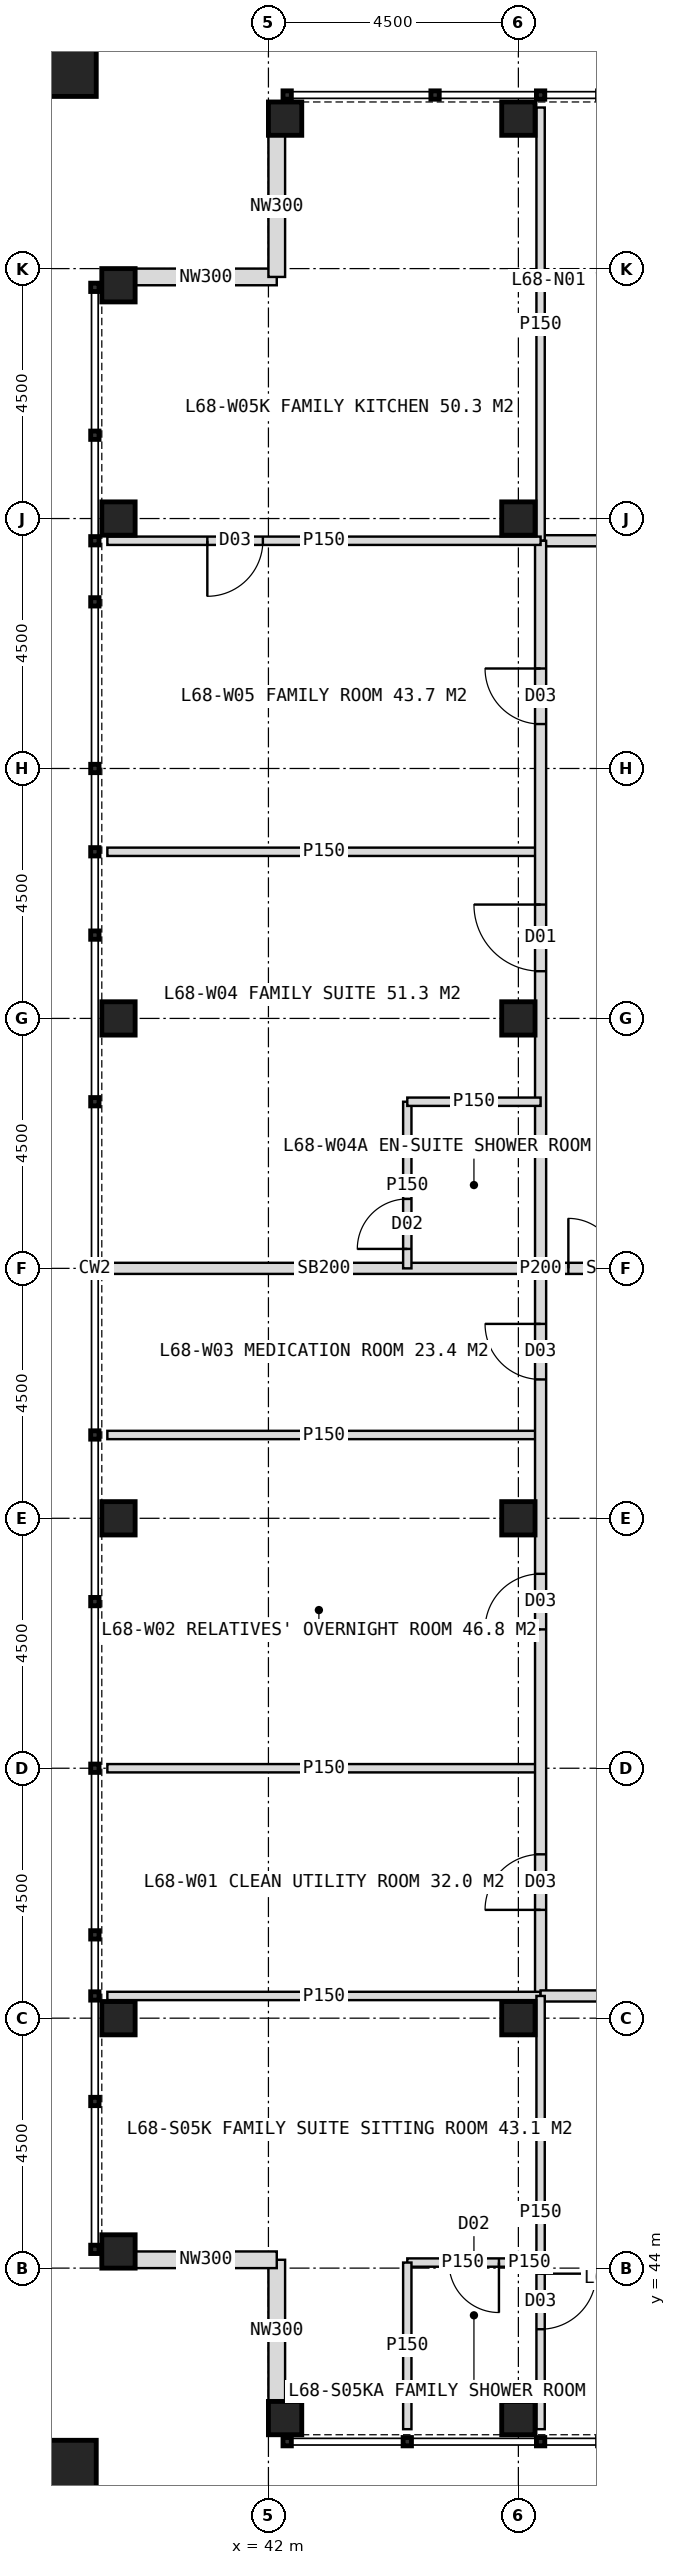
"""IFC4 building model, lengths in metres.
Left out: names, types, materials, properties, quantities, classifications, styles, units other than length and angle.
Written with IfcOpenShell. Run it as: python <this file> out.ifc"""

import sys

from ifc_helpers import new_model, si_unit, direction, frame, frame_2d, origin, origin_2d, place, context, subcontext, project, spatial, rectangle, hollow_rectangle, extrude, element, fill, save


model = new_model("IFC4")
c1 = context("Model", 3, precision=1e-05, world=origin(), true_north=direction((0.0, 1.0)))
c2 = subcontext(c1, "Body", "Model", "MODEL_VIEW")
j1 = project(units=[si_unit("LENGTHUNIT", "METRE"), si_unit("PLANEANGLEUNIT", "RADIAN")], contexts=[c1])
p1 = place(None, origin())
s1 = spatial("IfcSite", under=j1, at=p1, CompositionType="ELEMENT")
p2 = place(p1, origin())
s2 = spatial("IfcBuilding", under=s1, at=p2, CompositionType="ELEMENT")
p3 = place(p2, frame((0.0, 0.0, 282.0)))
s3 = spatial("IfcBuildingStorey", under=s2, at=p3, CompositionType="ELEMENT", Elevation=282.0)
for number, where, z_axis, x_axis in (
    (1, (46.5, 48.5, 0.0), (0.0, 0.0, 1.0), (1.0, 0.0, 0.0)),
    (2, (46.5, 75.5, 0.0), (0.0, 0.0, 1.0), (1.0, 0.0, 0.0)),
    (3, (46.5, 57.5, 0.0), (0.0, 0.0, 1.0), (1.0, 0.0, 0.0)),
    (4, (46.5, 66.5, 0.0), (0.0, 0.0, 1.0), (1.0, 0.0, 0.0)),
    (5, (42.3, 41.3, 0.0), (0.0, 0.0, 1.0), (1.0, 0.0, 0.0)),
    (6, (42.3, 82.7, 0.0), (0.0, 0.0, 1.0), (1.0, 0.0, 0.0)),
    (7, (39.3, 44.3, 0.0), (0.0, 0.0, 1.0), (1.0, 0.0, 0.0)),
    (8, (46.5, 41.3, 0.0), (0.0, 0.0, 1.0), (1.0, 0.0, 0.0)),
    (9, (46.5, 82.7, 0.0), (0.0, 0.0, 1.0), (1.0, 0.0, 0.0)),
    (10, (39.3, 48.5, 0.0), (0.0, 0.0, 1.0), (1.0, 0.0, 0.0)),
    (11, (39.3, 57.5, 0.0), (0.0, 0.0, 1.0), (1.0, 0.0, 0.0)),
    (12, (39.3, 66.5, 0.0), (0.0, 0.0, 1.0), (1.0, 0.0, 0.0)),
    (13, (39.3, 75.5, 0.0), (0.0, 0.0, 1.0), (1.0, 0.0, 0.0)),
    (14, (39.3, 79.7, 0.0), (0.0, 0.0, 1.0), (1.0, 0.0, 0.0)),
):
    element("IfcColumn", number, at=place(p3, frame(where, z_axis=z_axis, x_axis=x_axis)), inside=s3, PredefinedType="COLUMN", context=c2, shape_type="SweptSolid", body=[
        extrude(hollow_rectangle(XDim=0.6, YDim=0.6, WallThickness=0.04, at=origin_2d()), origin(), (0.0, 0.0, 1.0), 4.0),
    ])
for number, where, z_axis, x_axis in (
    (15, (38.4, 40.4, 0.0), (0.0, 0.0, 1.0), (1.0, 0.0, 0.0)),
    (16, (38.4, 83.6, 0.0), (0.0, 0.0, 1.0), (1.0, 0.0, 0.0)),
):
    element("IfcColumn", number, at=place(p3, frame(where, z_axis=z_axis, x_axis=x_axis)), inside=s3, PredefinedType="COLUMN", context=c2, shape_type="SweptSolid", body=[
        extrude(hollow_rectangle(XDim=1.0, YDim=1.0, WallThickness=0.06, at=origin_2d()), origin(), (0.0, 0.0, 1.0), 4.0),
    ])
for number, where, z_axis, x_axis in (
    (17, (39.6, 79.85, 0.0), (0.0, 0.0, 1.0), (1.0, 0.0, 0.0)),
    (18, (42.15, 79.85, 0.0), (0.0, 0.0, 1.0), (0.0, 1.0, 0.0)),
    (19, (42.15, 41.6, 0.0), (0.0, 0.0, 1.0), (0.0, 1.0, 0.0)),
    (20, (42.15, 44.15, 0.0), (0.0, 0.0, 1.0), (-1.0, 0.0, 0.0)),
):
    element("IfcWall", number, at=place(p3, frame(where, z_axis=z_axis, x_axis=x_axis)), inside=s3, PredefinedType="ELEMENTEDWALL", context=c2, shape_type="SweptSolid", body=[
        extrude(rectangle(XDim=2.55, YDim=0.3, at=frame_2d((1.275, 0.0))), origin(), (0.0, 0.0, 1.0), 2.95),
    ])
p4 = place(p3, frame((46.9, 75.1, 0.0), z_axis=(0.0, 0.0, 1.0), x_axis=(1.0, 0.0, 0.0)))
e21 = element("IfcWall", 21, at=p4, inside=s3, PredefinedType="PARTITIONING", context=c2, shape_type="SweptSolid", body=[
    extrude(rectangle(XDim=26.2, YDim=0.2, at=frame_2d((13.1, 0.0))), origin(), (0.0, 0.0, 1.0), 3.75),
])
p5 = place(p4, frame((1.55, 0.0, 0.0)))
e22 = element("IfcOpeningElement", 22, at=p5, cuts=e21, PredefinedType="OPENING", context=c2, shape_type="SweptSolid", body=[
    extrude(rectangle(XDim=1.0, YDim=2.1, at=frame_2d((0.5, 1.05))), frame((0.0, 0.11, 0.0), z_axis=(0.0, -1.0, 0.0), x_axis=(1.0, 0.0, 0.0)), (0.0, 0.0, 1.0), 0.22),
])
p6 = place(p4, frame((6.75, 0.0, 0.0)))
e23 = element("IfcOpeningElement", 23, at=p6, cuts=e21, PredefinedType="OPENING", context=c2, shape_type="SweptSolid", body=[
    extrude(rectangle(XDim=1.0, YDim=2.1, at=frame_2d((0.5, 1.05))), frame((0.0, 0.11, 0.0), z_axis=(0.0, -1.0, 0.0), x_axis=(1.0, 0.0, 0.0)), (0.0, 0.0, 1.0), 0.22),
])
p7 = place(p4, frame((14.25, 0.0, 0.0)))
e24 = element("IfcOpeningElement", 24, at=p7, cuts=e21, PredefinedType="OPENING", context=c2, shape_type="SweptSolid", body=[
    extrude(rectangle(XDim=1.2, YDim=2.2, at=frame_2d((0.6, 1.1))), frame((0.0, 0.11, 0.0), z_axis=(0.0, -1.0, 0.0), x_axis=(1.0, 0.0, 0.0)), (0.0, 0.0, 1.0), 0.22),
])
p8 = place(p4, frame((18.45, 0.0, 0.0)))
e25 = element("IfcOpeningElement", 25, at=p8, cuts=e21, PredefinedType="OPENING", context=c2, shape_type="SweptSolid", body=[
    extrude(rectangle(XDim=1.0, YDim=2.1, at=frame_2d((0.5, 1.05))), frame((0.0, 0.11, 0.0), z_axis=(0.0, -1.0, 0.0), x_axis=(1.0, 0.0, 0.0)), (0.0, 0.0, 1.0), 0.22),
])
p9 = place(p4, frame((23.25, 0.0, 0.0)))
e26 = element("IfcOpeningElement", 26, at=p9, cuts=e21, PredefinedType="OPENING", context=c2, shape_type="SweptSolid", body=[
    extrude(rectangle(XDim=1.2, YDim=2.2, at=frame_2d((0.6, 1.1))), frame((0.0, 0.11, 0.0), z_axis=(0.0, -1.0, 0.0), x_axis=(1.0, 0.0, 0.0)), (0.0, 0.0, 1.0), 0.22),
])
for number, where, z_axis, x_axis in (
    (27, (46.9, 75.1, 0.0), (0.0, 0.0, 1.0), (0.0, 1.0, 0.0)),
    (28, (46.9, 53.0, 0.0), (0.0, 0.0, 1.0), (-1.0, 0.0, 0.0)),
    (29, (46.9, 59.0, 0.0), (0.0, 0.0, 1.0), (-1.0, 0.0, 0.0)),
):
    element("IfcWall", number, at=place(p3, frame(where, z_axis=z_axis, x_axis=x_axis)), inside=s3, PredefinedType="PARTITIONING", context=c2, shape_type="SweptSolid", body=[
        extrude(rectangle(XDim=7.8, YDim=0.15, at=frame_2d((3.9, 0.0))), origin(), (0.0, 0.0, 1.0), 3.75),
    ])
p10 = place(p3, frame((46.9, 62.0, 0.0), z_axis=(0.0, 0.0, 1.0), x_axis=(-1.0, 0.0, 0.0)))
e30 = element("IfcWall", 30, at=p10, inside=s3, PredefinedType="SOLIDWALL", context=c2, shape_type="SweptSolid", body=[
    extrude(rectangle(XDim=7.8, YDim=0.2, at=frame_2d((3.9, 0.0))), origin(), (0.0, 0.0, 1.0), 2.75),
])
p11 = place(p3, frame((46.9, 69.5, 0.0), z_axis=(0.0, 0.0, 1.0), x_axis=(-1.0, 0.0, 0.0)))
e31 = element("IfcWall", 31, at=p11, inside=s3, PredefinedType="PARTITIONING", context=c2, shape_type="SweptSolid", body=[
    extrude(rectangle(XDim=7.8, YDim=0.15, at=frame_2d((3.9, 0.0))), origin(), (0.0, 0.0, 1.0), 3.75),
])
p12 = place(p3, frame((46.9, 48.9, 0.0), z_axis=(0.0, 0.0, 1.0), x_axis=(0.0, 1.0, 0.0)))
e32 = element("IfcWall", 32, at=p12, inside=s3, PredefinedType="PARTITIONING", context=c2, shape_type="SweptSolid", body=[
    extrude(rectangle(XDim=26.2, YDim=0.2, at=frame_2d((13.1, 0.0))), origin(), (0.0, 0.0, 1.0), 3.75),
])
p13 = place(p12, frame((1.55, 0.0, 0.0)))
e33 = element("IfcOpeningElement", 33, at=p13, cuts=e32, PredefinedType="OPENING", context=c2, shape_type="SweptSolid", body=[
    extrude(rectangle(XDim=1.0, YDim=2.1, at=frame_2d((0.5, 1.05))), frame((0.0, 0.11, 0.0), z_axis=(0.0, -1.0, 0.0), x_axis=(1.0, 0.0, 0.0)), (0.0, 0.0, 1.0), 0.22),
])
p14 = place(p12, frame((6.6, 0.0, 0.0)))
e34 = element("IfcOpeningElement", 34, at=p14, cuts=e32, PredefinedType="OPENING", context=c2, shape_type="SweptSolid", body=[
    extrude(rectangle(XDim=1.0, YDim=2.1, at=frame_2d((0.5, 1.05))), frame((0.0, 0.11, 0.0), z_axis=(0.0, -1.0, 0.0), x_axis=(1.0, 0.0, 0.0)), (0.0, 0.0, 1.0), 0.22),
])
p15 = place(p12, frame((11.1, 0.0, 0.0)))
e35 = element("IfcOpeningElement", 35, at=p15, cuts=e32, PredefinedType="OPENING", context=c2, shape_type="SweptSolid", body=[
    extrude(rectangle(XDim=1.0, YDim=2.1, at=frame_2d((0.5, 1.05))), frame((0.0, 0.11, 0.0), z_axis=(0.0, -1.0, 0.0), x_axis=(1.0, 0.0, 0.0)), (0.0, 0.0, 1.0), 0.22),
])
p16 = place(p12, frame((18.45, 0.0, 0.0)))
e36 = element("IfcOpeningElement", 36, at=p16, cuts=e32, PredefinedType="OPENING", context=c2, shape_type="SweptSolid", body=[
    extrude(rectangle(XDim=1.2, YDim=2.2, at=frame_2d((0.6, 1.1))), frame((0.0, 0.11, 0.0), z_axis=(0.0, -1.0, 0.0), x_axis=(1.0, 0.0, 0.0)), (0.0, 0.0, 1.0), 0.22),
])
p17 = place(p12, frame((22.9, 0.0, 0.0)))
e37 = element("IfcOpeningElement", 37, at=p17, cuts=e32, PredefinedType="OPENING", context=c2, shape_type="SweptSolid", body=[
    extrude(rectangle(XDim=1.0, YDim=2.1, at=frame_2d((0.5, 1.05))), frame((0.0, 0.11, 0.0), z_axis=(0.0, -1.0, 0.0), x_axis=(1.0, 0.0, 0.0)), (0.0, 0.0, 1.0), 0.22),
])
p18 = place(p3, frame((46.9, 48.9, 0.0), z_axis=(0.0, 0.0, 1.0), x_axis=(-1.0, 0.0, 0.0)))
e38 = element("IfcWall", 38, at=p18, inside=s3, PredefinedType="PARTITIONING", context=c2, shape_type="SweptSolid", body=[
    extrude(rectangle(XDim=7.8, YDim=0.15, at=frame_2d((3.9, 0.0))), origin(), (0.0, 0.0, 1.0), 3.75),
])
p19 = place(p3, frame((44.5, 62.0, 0.0), z_axis=(0.0, 0.0, 1.0), x_axis=(0.0, 1.0, 0.0)))
e39 = element("IfcWall", 39, at=p19, inside=s3, PredefinedType="PARTITIONING", context=c2, shape_type="SweptSolid", body=[
    extrude(rectangle(XDim=3.0, YDim=0.15, at=frame_2d((1.5, 0.0))), origin(), (0.0, 0.0, 1.0), 3.75),
])
p20 = place(p19, frame((0.35, 0.0, 0.0)))
e40 = element("IfcOpeningElement", 40, at=p20, cuts=e39, PredefinedType="OPENING", context=c2, shape_type="SweptSolid", body=[
    extrude(rectangle(XDim=0.9, YDim=2.1, at=frame_2d((0.45, 1.05))), frame((0.0, 0.085, 0.0), z_axis=(0.0, -1.0, 0.0), x_axis=(1.0, 0.0, 0.0)), (0.0, 0.0, 1.0), 0.17),
])
p21 = place(p3, frame((46.9, 65.0, 0.0), z_axis=(0.0, 0.0, 1.0), x_axis=(-1.0, 0.0, 0.0)))
e41 = element("IfcWall", 41, at=p21, inside=s3, PredefinedType="PARTITIONING", context=c2, shape_type="SweptSolid", body=[
    extrude(rectangle(XDim=2.4, YDim=0.15, at=frame_2d((1.2, 0.0))), origin(), (0.0, 0.0, 1.0), 3.75),
])
p22 = place(p3, frame((46.9, 75.1, 0.0), z_axis=(0.0, 0.0, 1.0), x_axis=(-1.0, 0.0, 0.0)))
e42 = element("IfcWall", 42, at=p22, inside=s3, PredefinedType="PARTITIONING", context=c2, shape_type="SweptSolid", body=[
    extrude(rectangle(XDim=7.8, YDim=0.15, at=frame_2d((3.9, 0.0))), origin(), (0.0, 0.0, 1.0), 3.75),
])
p23 = place(p22, frame((5.0, 0.0, 0.0)))
e43 = element("IfcOpeningElement", 43, at=p23, cuts=e42, PredefinedType="OPENING", context=c2, shape_type="SweptSolid", body=[
    extrude(rectangle(XDim=1.0, YDim=2.1, at=frame_2d((0.5, 1.05))), frame((0.0, 0.085, 0.0), z_axis=(0.0, -1.0, 0.0), x_axis=(1.0, 0.0, 0.0)), (0.0, 0.0, 1.0), 0.17),
])
p24 = place(p3, frame((73.1, 48.9, 0.0), z_axis=(0.0, 0.0, 1.0), x_axis=(-1.0, 0.0, 0.0)))
e44 = element("IfcWall", 44, at=p24, inside=s3, PredefinedType="PARTITIONING", context=c2, shape_type="SweptSolid", body=[
    extrude(rectangle(XDim=26.2, YDim=0.2, at=frame_2d((13.1, 0.0))), origin(), (0.0, 0.0, 1.0), 3.75),
])
p25 = place(p24, frame((1.75, 0.0, 0.0)))
e45 = element("IfcOpeningElement", 45, at=p25, cuts=e44, PredefinedType="OPENING", context=c2, shape_type="SweptSolid", body=[
    extrude(rectangle(XDim=1.2, YDim=2.2, at=frame_2d((0.6, 1.1))), frame((0.0, 0.11, 0.0), z_axis=(0.0, -1.0, 0.0), x_axis=(1.0, 0.0, 0.0)), (0.0, 0.0, 1.0), 0.22),
])
p26 = place(p24, frame((6.75, 0.0, 0.0)))
e46 = element("IfcOpeningElement", 46, at=p26, cuts=e44, PredefinedType="OPENING", context=c2, shape_type="SweptSolid", body=[
    extrude(rectangle(XDim=1.0, YDim=2.1, at=frame_2d((0.5, 1.05))), frame((0.0, 0.11, 0.0), z_axis=(0.0, -1.0, 0.0), x_axis=(1.0, 0.0, 0.0)), (0.0, 0.0, 1.0), 0.22),
])
p27 = place(p24, frame((11.85, 0.0, 0.0)))
e47 = element("IfcOpeningElement", 47, at=p27, cuts=e44, PredefinedType="OPENING", context=c2, shape_type="SweptSolid", body=[
    extrude(rectangle(XDim=1.0, YDim=2.1, at=frame_2d((0.5, 1.05))), frame((0.0, 0.11, 0.0), z_axis=(0.0, -1.0, 0.0), x_axis=(1.0, 0.0, 0.0)), (0.0, 0.0, 1.0), 0.22),
])
p28 = place(p24, frame((15.75, 0.0, 0.0)))
e48 = element("IfcOpeningElement", 48, at=p28, cuts=e44, PredefinedType="OPENING", context=c2, shape_type="SweptSolid", body=[
    extrude(rectangle(XDim=1.0, YDim=2.1, at=frame_2d((0.5, 1.05))), frame((0.0, 0.11, 0.0), z_axis=(0.0, -1.0, 0.0), x_axis=(1.0, 0.0, 0.0)), (0.0, 0.0, 1.0), 0.22),
])
p29 = place(p24, frame((23.25, 0.0, 0.0)))
e49 = element("IfcOpeningElement", 49, at=p29, cuts=e44, PredefinedType="OPENING", context=c2, shape_type="SweptSolid", body=[
    extrude(rectangle(XDim=1.2, YDim=2.2, at=frame_2d((0.6, 1.1))), frame((0.0, 0.11, 0.0), z_axis=(0.0, -1.0, 0.0), x_axis=(1.0, 0.0, 0.0)), (0.0, 0.0, 1.0), 0.22),
])
p30 = place(p3, frame((46.9, 48.9, 0.0), z_axis=(0.0, 0.0, 1.0), x_axis=(0.0, -1.0, 0.0)))
e50 = element("IfcWall", 50, at=p30, inside=s3, PredefinedType="PARTITIONING", context=c2, shape_type="SweptSolid", body=[
    extrude(rectangle(XDim=7.8, YDim=0.15, at=frame_2d((3.9, 0.0))), origin(), (0.0, 0.0, 1.0), 3.75),
])
p31 = place(p30, frame((5.0, 0.0, 0.0)))
e51 = element("IfcOpeningElement", 51, at=p31, cuts=e50, PredefinedType="OPENING", context=c2, shape_type="SweptSolid", body=[
    extrude(rectangle(XDim=1.0, YDim=2.1, at=frame_2d((0.5, 1.05))), frame((0.0, 0.085, 0.0), z_axis=(0.0, -1.0, 0.0), x_axis=(1.0, 0.0, 0.0)), (0.0, 0.0, 1.0), 0.17),
])
p32 = place(p3, frame((46.9, 44.1, 0.0), z_axis=(0.0, 0.0, 1.0), x_axis=(-1.0, 0.0, 0.0)))
e52 = element("IfcWall", 52, at=p32, inside=s3, PredefinedType="PARTITIONING", context=c2, shape_type="SweptSolid", body=[
    extrude(rectangle(XDim=0.4, YDim=0.15, at=frame_2d((0.2, 0.0))), origin(), (0.0, 0.0, 1.0), 3.75),
])
p33 = place(p3, frame((46.5, 44.1, 0.0), z_axis=(0.0, 0.0, 1.0), x_axis=(-1.0, 0.0, 0.0)))
e53 = element("IfcWall", 53, at=p33, inside=s3, PredefinedType="PARTITIONING", context=c2, shape_type="SweptSolid", body=[
    extrude(rectangle(XDim=2.0, YDim=0.15, at=frame_2d((1.0, 0.0))), origin(), (0.0, 0.0, 1.0), 2.95),
])
p34 = place(p33, frame((0.35, 0.0, 0.0)))
e54 = element("IfcOpeningElement", 54, at=p34, cuts=e53, PredefinedType="OPENING", context=c2, shape_type="SweptSolid", body=[
    extrude(rectangle(XDim=0.9, YDim=2.1, at=frame_2d((0.45, 1.05))), frame((0.0, 0.085, 0.0), z_axis=(0.0, -1.0, 0.0), x_axis=(1.0, 0.0, 0.0)), (0.0, 0.0, 1.0), 0.17),
])
p35 = place(p3, frame((44.5, 44.1, 0.0), z_axis=(0.0, 0.0, 1.0), x_axis=(0.0, -1.0, 0.0)))
e55 = element("IfcWall", 55, at=p35, inside=s3, PredefinedType="PARTITIONING", context=c2, shape_type="SweptSolid", body=[
    extrude(rectangle(XDim=3.0, YDim=0.15, at=frame_2d((1.5, 0.0))), origin(), (0.0, 0.0, 1.0), 3.75),
])
p36 = place(p3, frame((49.5, 62.0, 0.0), z_axis=(0.0, 0.0, 1.0), x_axis=(-1.0, 0.0, 0.0)))
e56 = element("IfcWall", 56, at=p36, inside=s3, PredefinedType="SOLIDWALL", context=c2, shape_type="SweptSolid", body=[
    extrude(rectangle(XDim=2.6, YDim=0.2, at=frame_2d((1.3, 0.0))), origin(), (0.0, 0.0, 1.0), 2.75),
])
p37 = place(p36, frame((0.3, 0.0, 0.0)))
e57 = element("IfcOpeningElement", 57, at=p37, cuts=e56, PredefinedType="OPENING", context=c2, shape_type="SweptSolid", body=[
    extrude(rectangle(XDim=1.8, YDim=2.2, at=frame_2d((0.9, 1.1))), frame((0.0, 0.11, 0.0), z_axis=(0.0, -1.0, 0.0), x_axis=(1.0, 0.0, 0.0)), (0.0, 0.0, 1.0), 0.22),
])
p38 = place(p13, origin())
e58 = element("IfcDoor", 58, at=p38, inside=s3, OperationType="SINGLE_SWING_LEFT", PredefinedType="DOOR", context=c2, shape_type="SweptSolid", body=[
    extrude(rectangle(XDim=1.0, YDim=2.1, at=frame_2d((0.5, 1.05))), frame((0.0, 0.025, 0.0), z_axis=(0.0, -1.0, 0.0), x_axis=(1.0, 0.0, 0.0)), (0.0, 0.0, 1.0), 0.05),
])
fill(e33, e58)
p39 = place(p14, origin())
e59 = element("IfcDoor", 59, at=p39, inside=s3, OperationType="SINGLE_SWING_LEFT", PredefinedType="DOOR", context=c2, shape_type="SweptSolid", body=[
    extrude(rectangle(XDim=1.0, YDim=2.1, at=frame_2d((0.5, 1.05))), frame((0.0, 0.025, 0.0), z_axis=(0.0, -1.0, 0.0), x_axis=(1.0, 0.0, 0.0)), (0.0, 0.0, 1.0), 0.05),
])
fill(e34, e59)
p40 = place(p15, origin())
e60 = element("IfcDoor", 60, at=p40, inside=s3, OperationType="SINGLE_SWING_RIGHT", PredefinedType="DOOR", context=c2, shape_type="SweptSolid", body=[
    extrude(rectangle(XDim=1.0, YDim=2.1, at=frame_2d((0.5, 1.05))), frame((0.0, 0.025, 0.0), z_axis=(0.0, -1.0, 0.0), x_axis=(1.0, 0.0, 0.0)), (0.0, 0.0, 1.0), 0.05),
])
fill(e35, e60)
p41 = place(p16, origin())
e61 = element("IfcDoor", 61, at=p41, inside=s3, OperationType="SINGLE_SWING_RIGHT", PredefinedType="DOOR", context=c2, shape_type="SweptSolid", body=[
    extrude(rectangle(XDim=1.2, YDim=2.2, at=frame_2d((0.6, 1.1))), frame((0.0, 0.025, 0.0), z_axis=(0.0, -1.0, 0.0), x_axis=(1.0, 0.0, 0.0)), (0.0, 0.0, 1.0), 0.05),
])
fill(e36, e61)
p42 = place(p20, origin())
e62 = element("IfcDoor", 62, at=p42, inside=s3, OperationType="SINGLE_SWING_LEFT", PredefinedType="DOOR", context=c2, shape_type="SweptSolid", body=[
    extrude(rectangle(XDim=0.9, YDim=2.1, at=frame_2d((0.45, 1.05))), frame((0.0, 0.025, 0.0), z_axis=(0.0, -1.0, 0.0), x_axis=(1.0, 0.0, 0.0)), (0.0, 0.0, 1.0), 0.05),
])
fill(e40, e62)
p43 = place(p23, origin())
e63 = element("IfcDoor", 63, at=p43, inside=s3, OperationType="SINGLE_SWING_RIGHT", PredefinedType="DOOR", context=c2, shape_type="SweptSolid", body=[
    extrude(rectangle(XDim=1.0, YDim=2.1, at=frame_2d((0.5, 1.05))), frame((0.0, 0.025, 0.0), z_axis=(0.0, -1.0, 0.0), x_axis=(1.0, 0.0, 0.0)), (0.0, 0.0, 1.0), 0.05),
])
fill(e43, e63)
p44 = place(p17, origin())
e64 = element("IfcDoor", 64, at=p44, inside=s3, OperationType="SINGLE_SWING_RIGHT", PredefinedType="DOOR", context=c2, shape_type="SweptSolid", body=[
    extrude(rectangle(XDim=1.0, YDim=2.1, at=frame_2d((0.5, 1.05))), frame((0.0, 0.025, 0.0), z_axis=(0.0, -1.0, 0.0), x_axis=(1.0, 0.0, 0.0)), (0.0, 0.0, 1.0), 0.05),
])
fill(e37, e64)
p45 = place(p34, origin())
e65 = element("IfcDoor", 65, at=p45, inside=s3, OperationType="SINGLE_SWING_LEFT", PredefinedType="DOOR", context=c2, shape_type="SweptSolid", body=[
    extrude(rectangle(XDim=0.9, YDim=2.1, at=frame_2d((0.45, 1.05))), frame((0.0, 0.025, 0.0), z_axis=(0.0, -1.0, 0.0), x_axis=(1.0, 0.0, 0.0)), (0.0, 0.0, 1.0), 0.05),
])
fill(e54, e65)
p46 = place(p31, origin())
e66 = element("IfcDoor", 66, at=p46, inside=s3, OperationType="SINGLE_SWING_LEFT", PredefinedType="DOOR", context=c2, shape_type="SweptSolid", body=[
    extrude(rectangle(XDim=1.0, YDim=2.1, at=frame_2d((0.5, 1.05))), frame((0.0, 0.025, 0.0), z_axis=(0.0, -1.0, 0.0), x_axis=(1.0, 0.0, 0.0)), (0.0, 0.0, 1.0), 0.05),
])
fill(e51, e66)
p47 = place(p37, origin())
e67 = element("IfcDoor", 67, at=p47, inside=s3, OperationType="DOUBLE_DOOR_DOUBLE_SWING", PredefinedType="DOOR", context=c2, shape_type="SweptSolid", body=[
    extrude(rectangle(XDim=1.8, YDim=2.2, at=frame_2d((0.9, 1.1))), frame((0.0, 0.025, 0.0), z_axis=(0.0, -1.0, 0.0), x_axis=(1.0, 0.0, 0.0)), (0.0, 0.0, 1.0), 0.05),
])
fill(e57, e67)
save(model, sys.argv[1])
